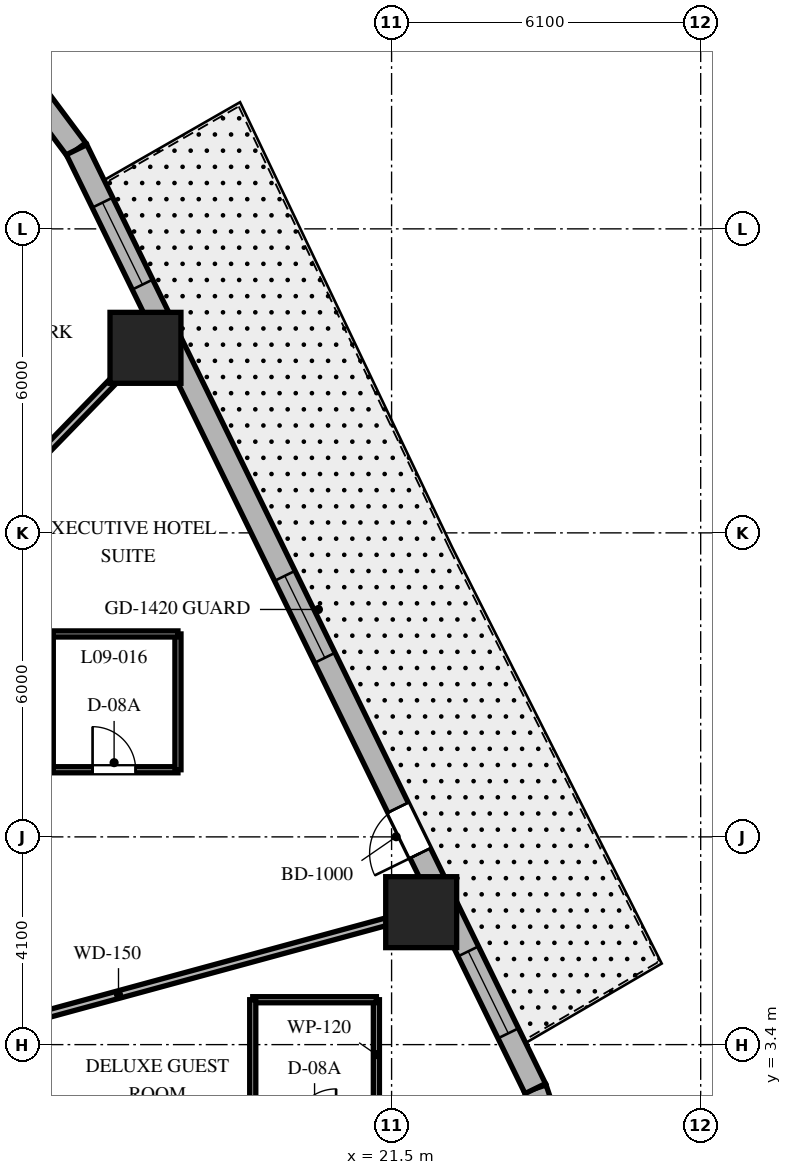
"""IFC4 building model, lengths in metres.
Left out: names, types, materials, properties, quantities, classifications, styles, units other than length and angle.
Written with IfcOpenShell. Run it as: python <this file> out.ifc"""

import sys

from ifc_helpers import new_model, si_unit, direction, frame, frame_2d, origin, origin_2d, place, context, subcontext, project, spatial, rectangle, extrude, element, fill, save


model = new_model("IFC4")
c1 = context("Model", 3, precision=1e-05, world=origin(), true_north=direction((0.0, 1.0)))
c2 = subcontext(c1, "Body", "Model", "MODEL_VIEW")
j1 = project(units=[si_unit("LENGTHUNIT", "METRE"), si_unit("PLANEANGLEUNIT", "RADIAN")], contexts=[c1])
p1 = place(None, origin())
s1 = spatial("IfcSite", under=j1, at=p1, CompositionType="ELEMENT")
p2 = place(p1, origin())
s2 = spatial("IfcBuilding", under=s1, at=p2, CompositionType="ELEMENT")
p3 = place(p2, frame((0.0, 0.0, 45.3)))
s3 = spatial("IfcBuildingStorey", under=s2, at=p3, CompositionType="ELEMENT", Elevation=45.3)
for number, where, z_axis, x_axis in (
    (1, (22.084, 6.014, 0.0), (0.0, 0.0, 1.0), (1.0, 0.0, 0.0)),
    (2, (16.643, 17.152, 0.0), (0.0, 0.0, 1.0), (1.0, 0.0, 0.0)),
):
    element("IfcColumn", number, at=place(p3, frame(where, z_axis=z_axis, x_axis=x_axis)), inside=s3, PredefinedType="COLUMN", context=c2, shape_type="SweptSolid", body=[
        extrude(rectangle(XDim=1.4, YDim=1.4, at=origin_2d()), origin(), (0.0, 0.0, 1.0), 3.7),
    ])
p4 = place(p3, frame((24.621, 1.682, 0.0), z_axis=(0.0, 0.0, 1.0), x_axis=(-0.317697451681, 0.948192137278, 0.0)))
e3 = element("IfcWall", 3, at=p4, inside=s3, PredefinedType="SOLIDWALL", context=c2, shape_type="SweptSolid", body=[
    extrude(rectangle(XDim=0.897, YDim=0.45, at=frame_2d((0.448, 0.0))), origin(), (0.0, 0.0, 1.0), 3.4),
])
p5 = place(p3, frame((15.284, 21.062, 0.0), z_axis=(0.0, 0.0, 1.0), x_axis=(-0.597595366449, 0.801797841104, 0.0)))
e4 = element("IfcWall", 4, at=p5, inside=s3, PredefinedType="SOLIDWALL", context=c2, shape_type="SweptSolid", body=[
    extrude(rectangle(XDim=1.269, YDim=0.45, at=frame_2d((0.634, 0.0))), origin(), (0.0, 0.0, 1.0), 3.4),
])
p6 = place(p3, frame((24.336, 2.532, 0.0), z_axis=(0.0, 0.0, 1.0), x_axis=(-0.438931326393, 0.898520612291, 0.0)))
e5 = element("IfcWall", 5, at=p6, inside=s3, PredefinedType="SOLIDWALL", context=c2, shape_type="SweptSolid", body=[
    extrude(rectangle(XDim=20.623, YDim=0.45, at=frame_2d((10.312, 0.0))), origin(), (0.0, 0.0, 1.0), 3.4),
])
p7 = place(p6, frame((5.171, 0.0, 0.0)))
e6 = element("IfcOpeningElement", 6, at=p7, cuts=e5, PredefinedType="OPENING", context=c2, shape_type="SweptSolid", body=[
    extrude(rectangle(XDim=1.0, YDim=2.15, at=frame_2d((0.5, 1.075))), frame((0.0, 0.235, 0.0), z_axis=(0.0, -1.0, 0.0), x_axis=(1.0, 0.0, 0.0)), (0.0, 0.0, 1.0), 0.47),
])
p8 = place(p6, frame((1.214, 0.0, 0.8)))
e7 = element("IfcOpeningElement", 7, at=p8, cuts=e5, PredefinedType="OPENING", context=c2, shape_type="SweptSolid", body=[
    extrude(rectangle(XDim=1.8, YDim=1.8, at=frame_2d((0.9, 0.9))), frame((0.0, 0.235, 0.0), z_axis=(0.0, -1.0, 0.0), x_axis=(1.0, 0.0, 0.0)), (0.0, 0.0, 1.0), 0.47),
])
p9 = place(p6, frame((9.462, 0.0, 0.8)))
e8 = element("IfcOpeningElement", 8, at=p9, cuts=e5, PredefinedType="OPENING", context=c2, shape_type="SweptSolid", body=[
    extrude(rectangle(XDim=1.8, YDim=1.8, at=frame_2d((0.9, 0.9))), frame((0.0, 0.235, 0.0), z_axis=(0.0, -1.0, 0.0), x_axis=(1.0, 0.0, 0.0)), (0.0, 0.0, 1.0), 0.47),
])
p10 = place(p6, frame((17.66, 0.0, 0.8)))
e9 = element("IfcOpeningElement", 9, at=p10, cuts=e5, PredefinedType="OPENING", context=c2, shape_type="SweptSolid", body=[
    extrude(rectangle(XDim=1.8, YDim=1.8, at=frame_2d((0.9, 0.9))), frame((0.0, 0.235, 0.0), z_axis=(0.0, -1.0, 0.0), x_axis=(1.0, 0.0, 0.0)), (0.0, 0.0, 1.0), 0.47),
])
p11 = place(p3, frame((11.35, 3.091, 0.0), z_axis=(0.0, 0.0, 1.0), x_axis=(0.964859685283, 0.262765651704, 0.0)))
e10 = element("IfcWall", 10, at=p11, inside=s3, PredefinedType="PARTITIONING", context=c2, shape_type="SweptSolid", body=[
    extrude(rectangle(XDim=11.629, YDim=0.15, at=frame_2d((5.814, 0.0))), origin(), (0.0, 0.0, 1.0), 2.54),
])
p12 = place(p3, frame((9.558, 9.85, 0.0), z_axis=(0.0, 0.0, 1.0), x_axis=(0.69638346089, 0.717669893056, 0.0)))
e11 = element("IfcWall", 11, at=p12, inside=s3, PredefinedType="PARTITIONING", context=c2, shape_type="SweptSolid", body=[
    extrude(rectangle(XDim=10.701, YDim=0.15, at=frame_2d((5.351, 0.0))), origin(), (0.0, 0.0, 1.0), 2.54),
])
p13 = place(p3, frame((21.2, 1.676, 0.0), z_axis=(0.0, 0.0, 1.0), x_axis=(0.0, 1.0, 0.0)))
e12 = element("IfcWall", 12, at=p13, inside=s3, PredefinedType="PARTITIONING", context=c2, shape_type="SweptSolid", body=[
    extrude(rectangle(XDim=2.61, YDim=0.12, at=frame_2d((1.305, 0.0))), origin(), (0.0, 0.0, 1.0), 3.4),
])
p14 = place(p3, frame((21.2, 4.286, 0.0), z_axis=(0.0, 0.0, 1.0), x_axis=(-1.0, 0.0, 0.0)))
e13 = element("IfcWall", 13, at=p14, inside=s3, PredefinedType="PARTITIONING", context=c2, shape_type="SweptSolid", body=[
    extrude(rectangle(XDim=2.44, YDim=0.12, at=frame_2d((1.22, 0.0))), origin(), (0.0, 0.0, 1.0), 3.4),
])
p15 = place(p3, frame((18.76, 4.286, 0.0), z_axis=(0.0, 0.0, 1.0), x_axis=(0.0, -1.0, 0.0)))
e14 = element("IfcWall", 14, at=p15, inside=s3, PredefinedType="PARTITIONING", context=c2, shape_type="SweptSolid", body=[
    extrude(rectangle(XDim=2.61, YDim=0.12, at=frame_2d((1.305, 0.0))), origin(), (0.0, 0.0, 1.0), 3.4),
])
p16 = place(p3, frame((14.764, 8.825, 0.0), z_axis=(0.0, 0.0, 1.0), x_axis=(1.0, 0.0, 0.0)))
e15 = element("IfcWall", 15, at=p16, inside=s3, PredefinedType="PARTITIONING", context=c2, shape_type="SweptSolid", body=[
    extrude(rectangle(XDim=2.52, YDim=0.12, at=frame_2d((1.26, 0.0))), origin(), (0.0, 0.0, 1.0), 2.927),
])
p17 = place(p16, frame((0.835, 0.0, 0.0)))
e16 = element("IfcOpeningElement", 16, at=p17, cuts=e15, PredefinedType="OPENING", context=c2, shape_type="SweptSolid", body=[
    extrude(rectangle(XDim=0.85, YDim=2.03, at=frame_2d((0.425, 1.015))), frame((0.0, 0.07, 0.0), z_axis=(0.0, -1.0, 0.0), x_axis=(1.0, 0.0, 0.0)), (0.0, 0.0, 1.0), 0.14),
])
p18 = place(p3, frame((17.284, 8.825, 0.0), z_axis=(0.0, 0.0, 1.0), x_axis=(0.0, 1.0, 0.0)))
e17 = element("IfcWall", 17, at=p18, inside=s3, PredefinedType="PARTITIONING", context=c2, shape_type="SweptSolid", body=[
    extrude(rectangle(XDim=2.68, YDim=0.12, at=frame_2d((1.34, 0.0))), origin(), (0.0, 0.0, 1.0), 3.4),
])
p19 = place(p3, frame((17.284, 11.505, 0.0), z_axis=(0.0, 0.0, 1.0), x_axis=(-1.0, 0.0, 0.0)))
e18 = element("IfcWall", 18, at=p19, inside=s3, PredefinedType="PARTITIONING", context=c2, shape_type="SweptSolid", body=[
    extrude(rectangle(XDim=2.52, YDim=0.12, at=frame_2d((1.26, 0.0))), origin(), (0.0, 0.0, 1.0), 2.927),
])
p20 = place(p3, frame((14.764, 11.505, 0.0), z_axis=(0.0, 0.0, 1.0), x_axis=(0.0, -1.0, 0.0)))
e19 = element("IfcWall", 19, at=p20, inside=s3, PredefinedType="PARTITIONING", context=c2, shape_type="SweptSolid", body=[
    extrude(rectangle(XDim=2.68, YDim=0.12, at=frame_2d((1.34, 0.0))), origin(), (0.0, 0.0, 1.0), 3.4),
])
p21 = place(p7, origin())
e20 = element("IfcDoor", 20, at=p21, inside=s3, OperationType="SINGLE_SWING_LEFT", PredefinedType="DOOR", context=c2, shape_type="SweptSolid", body=[
    extrude(rectangle(XDim=1.0, YDim=2.15, at=frame_2d((0.5, 1.075))), frame((0.0, 0.025, 0.0), z_axis=(0.0, -1.0, 0.0), x_axis=(1.0, 0.0, 0.0)), (0.0, 0.0, 1.0), 0.05),
])
fill(e6, e20)
p22 = place(p8, origin())
e21 = element("IfcWindow", 21, at=p22, inside=s3, PartitioningType="SINGLE_PANEL", PredefinedType="WINDOW", context=c2, shape_type="SweptSolid", body=[
    extrude(rectangle(XDim=1.8, YDim=1.8, at=frame_2d((0.9, 0.9))), frame((0.0, 0.03, 0.0), z_axis=(0.0, -1.0, 0.0), x_axis=(1.0, 0.0, 0.0)), (0.0, 0.0, 1.0), 0.06),
])
fill(e7, e21)
p23 = place(p9, origin())
e22 = element("IfcWindow", 22, at=p23, inside=s3, PartitioningType="SINGLE_PANEL", PredefinedType="WINDOW", context=c2, shape_type="SweptSolid", body=[
    extrude(rectangle(XDim=1.8, YDim=1.8, at=frame_2d((0.9, 0.9))), frame((0.0, 0.03, 0.0), z_axis=(0.0, -1.0, 0.0), x_axis=(1.0, 0.0, 0.0)), (0.0, 0.0, 1.0), 0.06),
])
fill(e8, e22)
p24 = place(p10, origin())
e23 = element("IfcWindow", 23, at=p24, inside=s3, PartitioningType="SINGLE_PANEL", PredefinedType="WINDOW", context=c2, shape_type="SweptSolid", body=[
    extrude(rectangle(XDim=1.8, YDim=1.8, at=frame_2d((0.9, 0.9))), frame((0.0, 0.03, 0.0), z_axis=(0.0, -1.0, 0.0), x_axis=(1.0, 0.0, 0.0)), (0.0, 0.0, 1.0), 0.06),
])
fill(e9, e23)
p25 = place(p17, origin())
e24 = element("IfcDoor", 24, at=p25, inside=s3, OperationType="SINGLE_SWING_LEFT", PredefinedType="DOOR", context=c2, shape_type="SweptSolid", body=[
    extrude(rectangle(XDim=0.85, YDim=2.03, at=frame_2d((0.425, 1.015))), frame((0.0, 0.025, 0.0), z_axis=(0.0, -1.0, 0.0), x_axis=(1.0, 0.0, 0.0)), (0.0, 0.0, 1.0), 0.05),
])
fill(e16, e24)
save(model, sys.argv[1])
